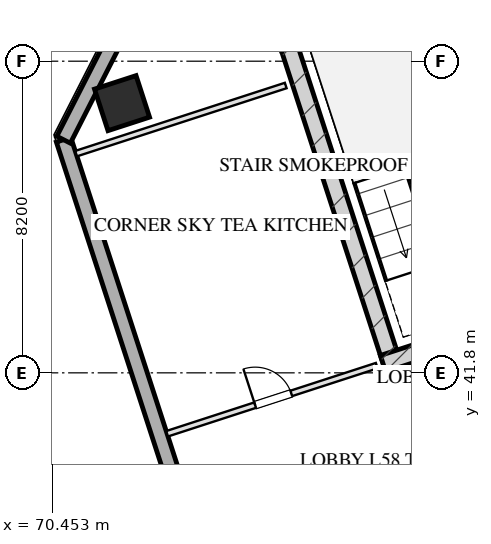
"""IFC4 building model, lengths in metres.
Left out: names, types, materials, properties, quantities, classifications, styles, units other than length and angle.
Written with IfcOpenShell. Run it as: python <this file> out.ifc"""

import sys

from ifc_helpers import new_model, si_unit, direction, frame, frame_2d, origin, origin_2d, place, context, subcontext, project, spatial, rectangle, hollow_rectangle, extrude, element, fill, save


model = new_model("IFC4")
c1 = context("Model", 3, precision=1e-05, world=origin(), true_north=direction((0.0, 1.0)))
c2 = subcontext(c1, "Body", "Model", "MODEL_VIEW")
j1 = project(units=[si_unit("LENGTHUNIT", "METRE"), si_unit("PLANEANGLEUNIT", "RADIAN")], contexts=[c1])
p1 = place(None, origin())
s1 = spatial("IfcSite", under=j1, at=p1, CompositionType="ELEMENT")
p2 = place(p1, origin())
s2 = spatial("IfcBuilding", under=s1, at=p2, CompositionType="ELEMENT")
p3 = place(p2, frame((0.0, 0.0, 216.2)))
s3 = spatial("IfcBuildingStorey", under=s2, at=p3, CompositionType="ELEMENT", Elevation=216.2)
p4 = place(p3, frame((79.442, 41.899, 0.0), z_axis=(0.0, 0.0, 1.0), x_axis=(-0.309035778627, 0.951050412717, 0.0)))
e1 = element("IfcWall", 1, at=p4, inside=s3, PredefinedType="SHEAR", context=c2, shape_type="SweptSolid", body=[
    extrude(rectangle(XDim=9.33, YDim=0.45, at=frame_2d((4.665, 0.0))), origin(), (0.0, 0.0, 1.0), 3.45),
])
p5 = place(p3, frame((79.159, 42.043, 0.0), z_axis=(0.0, 0.0, 1.0), x_axis=(0.951047485828, 0.309044785913, 0.0)))
e2 = element("IfcWall", 2, at=p5, inside=s3, PredefinedType="SHEAR", context=c2, shape_type="SweptSolid", body=[
    extrude(rectangle(XDim=4.145, YDim=0.45, at=frame_2d((2.073, 0.0))), origin(), (0.0, 0.0, 1.0), 3.45),
])
p6 = place(p3, frame((72.29, 48.896, 0.0), z_axis=(0.0, 0.0, 1.0), x_axis=(0.951056516295, 0.309016994375, 0.0)))
e3 = element("IfcColumn", 3, at=p6, inside=s3, PredefinedType="COLUMN", context=c2, shape_type="SweptSolid", body=[
    extrude(hollow_rectangle(XDim=1.15, YDim=1.15, WallThickness=0.04, at=origin_2d()), origin(), (0.0, 0.0, 1.0), 3.451),
])
p7 = place(p3, frame((82.618, 11.414, 0.0), z_axis=(0.0, 0.0, 1.0), x_axis=(-0.309016491071, 0.951056679828, 0.0)))
e4 = element("IfcWall", 4, at=p7, inside=s3, PredefinedType="SOLIDWALL", context=c2, shape_type="SweptSolid", body=[
    extrude(rectangle(XDim=38.4, YDim=0.4, at=frame_2d((19.2, 0.0))), origin(), (0.0, 0.0, 1.0), 2.55),
])
p8 = place(p7, frame((24.15, 0.0, 0.0)))
e5 = element("IfcOpeningElement", 5, at=p8, cuts=e4, PredefinedType="OPENING", context=c2, shape_type="SweptSolid", body=[
    extrude(rectangle(XDim=1.8, YDim=2.2, at=frame_2d((0.9, 1.1))), frame((0.0, 0.21, 0.0), z_axis=(0.0, -1.0, 0.0), x_axis=(1.0, 0.0, 0.0)), (0.0, 0.0, 1.0), 0.42),
])
p9 = place(p3, frame((70.752, 47.934, 0.0), z_axis=(0.0, 0.0, 1.0), x_axis=(0.453949291228, 0.891027519774, 0.0)))
e6 = element("IfcWall", 6, at=p9, inside=s3, PredefinedType="SOLIDWALL", context=c2, shape_type="SweptSolid", body=[
    extrude(rectangle(XDim=3.111, YDim=0.4, at=frame_2d((1.556, 0.0))), origin(), (0.0, 0.0, 1.0), 2.55),
])
p10 = place(p3, frame((74.177, 36.745, 0.0), z_axis=(0.0, 0.0, 1.0), x_axis=(-0.984966283934, 0.172746691759, 0.0)))
e7 = element("IfcWall", 7, at=p10, inside=s3, PredefinedType="SOLIDWALL", context=c2, shape_type="SweptSolid", body=[
    extrude(rectangle(XDim=27.237, YDim=0.35, at=frame_2d((13.618, 0.0))), origin(), (0.0, 0.0, 1.0), 3.15),
])
p11 = place(p3, frame((71.081, 47.568, 0.0), z_axis=(0.0, 0.0, 1.0), x_axis=(0.951059431056, 0.309008023519, 0.0)))
e8 = element("IfcWall", 8, at=p11, inside=s3, PredefinedType="PARTITIONING", context=c2, shape_type="SweptSolid", body=[
    extrude(rectangle(XDim=5.8, YDim=0.15, at=frame_2d((2.9, 0.0))), origin(), (0.0, 0.0, 1.0), 3.155),
])
p12 = place(p3, frame((73.476, 40.197, 0.0), z_axis=(0.0, 0.0, 1.0), x_axis=(0.951059431056, 0.309008023519, 0.0)))
e9 = element("IfcWall", 9, at=p12, inside=s3, PredefinedType="PARTITIONING", context=c2, shape_type="SweptSolid", body=[
    extrude(rectangle(XDim=5.8, YDim=0.15, at=frame_2d((2.9, 0.0))), origin(), (0.0, 0.0, 1.0), 3.155),
])
p13 = place(p12, frame((2.436, 0.0, 0.0)))
e10 = element("IfcOpeningElement", 10, at=p13, cuts=e9, PredefinedType="OPENING", context=c2, shape_type="SweptSolid", body=[
    extrude(rectangle(XDim=1.0, YDim=2.05, at=frame_2d((0.5, 1.025))), frame((0.0, 0.085, 0.0), z_axis=(0.0, -1.0, 0.0), x_axis=(1.0, 0.0, 0.0)), (0.0, 0.0, 1.0), 0.17),
])
p14 = place(p13, origin())
e11 = element("IfcDoor", 11, at=p14, inside=s3, OperationType="SINGLE_SWING_LEFT", PredefinedType="DOOR", context=c2, shape_type="SweptSolid", body=[
    extrude(rectangle(XDim=1.0, YDim=2.05, at=frame_2d((0.5, 1.025))), frame((0.0, 0.025, 0.0), z_axis=(0.0, -1.0, 0.0), x_axis=(1.0, 0.0, 0.0)), (0.0, 0.0, 1.0), 0.05),
])
fill(e10, e11)
save(model, sys.argv[1])
